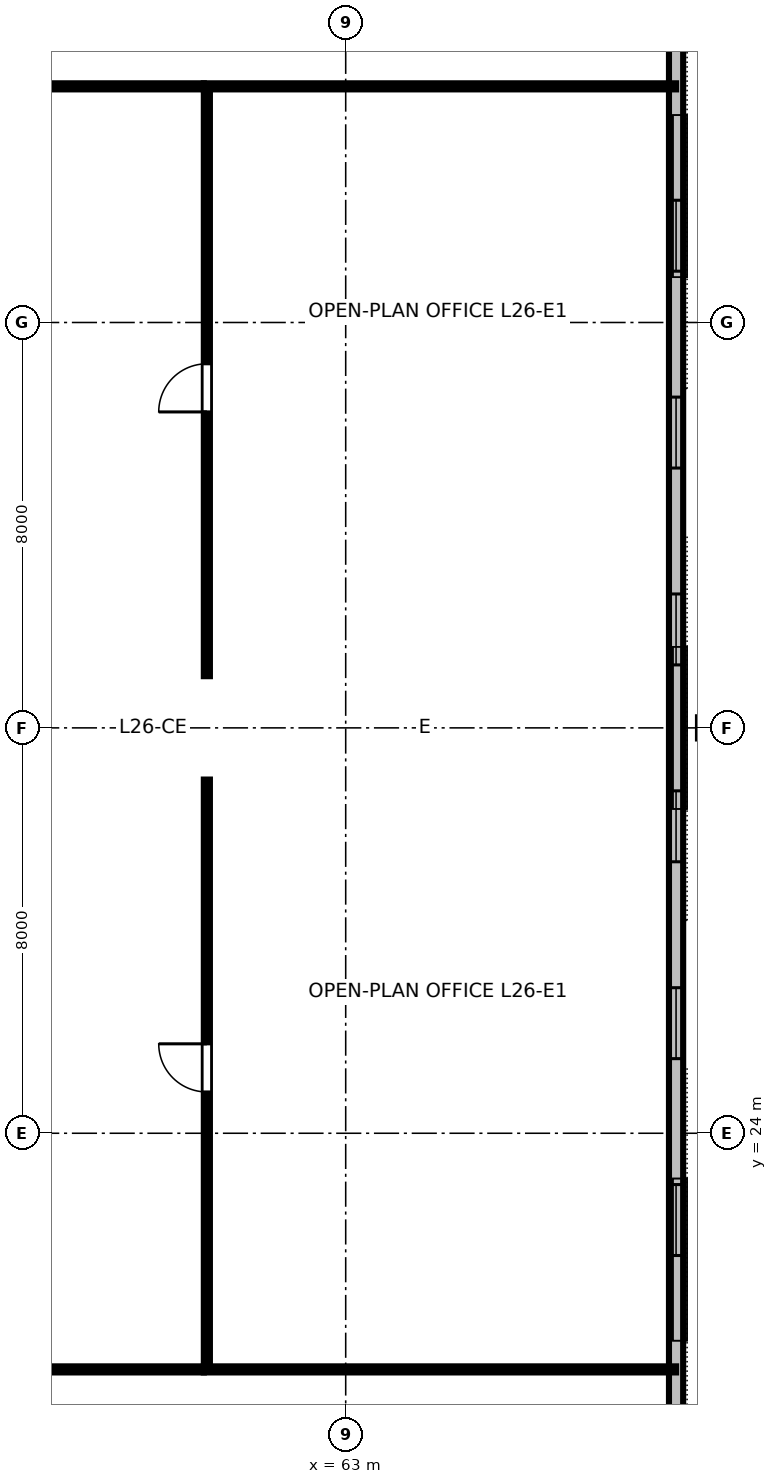
"""IFC4 building model, lengths in metres.
Left out: names, types, materials, properties, quantities, classifications, styles, units other than length and angle.
Written with IfcOpenShell. Run it as: python <this file> out.ifc"""

import sys

from ifc_helpers import new_model, si_unit, direction, frame, frame_2d, origin, origin_2d, place, context, subcontext, project, spatial, rectangle, i_section, extrude, element, fill, save


model = new_model("IFC4")
c1 = context("Model", 3, precision=1e-05, world=origin(), true_north=direction((0.0, 1.0)))
c2 = subcontext(c1, "Body", "Model", "MODEL_VIEW")
j1 = project(units=[si_unit("LENGTHUNIT", "METRE"), si_unit("PLANEANGLEUNIT", "RADIAN")], contexts=[c1])
p1 = place(None, origin())
s1 = spatial("IfcSite", under=j1, at=p1, CompositionType="ELEMENT")
p2 = place(p1, origin())
s2 = spatial("IfcBuilding", under=s1, at=p2, CompositionType="ELEMENT")
p3 = place(p2, frame((0.0, 0.0, 102.4)))
s3 = spatial("IfcBuildingStorey", under=s2, at=p3, CompositionType="ELEMENT", Elevation=102.4)
p4 = place(p3, frame((70.18, 32.0, 0.0), z_axis=(-0.190004151907, 0.0, 0.981783286809), x_axis=(0.981783286809, 0.0, 0.190004151907)))
e1 = element("IfcColumn", 1, at=p4, inside=s3, PredefinedType="COLUMN", context=c2, shape_type="SweptSolid", body=[
    extrude(i_section(OverallWidth=0.418, OverallDepth=0.455, WebThickness=0.042, FlangeThickness=0.068, FilletRadius=0.025, at=origin_2d()), origin(), (0.0, 0.0, 1.0), 3.42),
])
p5 = place(p3, frame((69.52, 15.36, 0.0), z_axis=(0.0, 0.0, 1.0), x_axis=(0.0, 1.0, 0.0)))
e2 = element("IfcWall", 2, at=p5, inside=s3, PredefinedType="STANDARD", context=c2, shape_type="SweptSolid", body=[
    extrude(rectangle(XDim=33.28, YDim=0.28, at=frame_2d((16.64, 0.0))), origin(), (0.0, 0.0, 1.0), 2.662),
])
p6 = place(p5, frame((6.228, 0.0, 0.85)))
e3 = element("IfcOpeningElement", 3, at=p6, cuts=e2, PredefinedType="OPENING", context=c2, shape_type="SweptSolid", body=[
    extrude(rectangle(XDim=1.4, YDim=1.2, at=frame_2d((0.7, 0.6))), frame((0.0, 0.15, 0.0), z_axis=(0.0, -1.0, 0.0), x_axis=(1.0, 0.0, 0.0)), (0.0, 0.0, 1.0), 0.3),
])
p7 = place(p5, frame((10.113, 0.0, 0.85)))
e4 = element("IfcOpeningElement", 4, at=p7, cuts=e2, PredefinedType="OPENING", context=c2, shape_type="SweptSolid", body=[
    extrude(rectangle(XDim=1.4, YDim=1.2, at=frame_2d((0.7, 0.6))), frame((0.0, 0.15, 0.0), z_axis=(0.0, -1.0, 0.0), x_axis=(1.0, 0.0, 0.0)), (0.0, 0.0, 1.0), 0.3),
])
p8 = place(p5, frame((13.998, 0.0, 0.85)))
e5 = element("IfcOpeningElement", 5, at=p8, cuts=e2, PredefinedType="OPENING", context=c2, shape_type="SweptSolid", body=[
    extrude(rectangle(XDim=1.4, YDim=1.2, at=frame_2d((0.7, 0.6))), frame((0.0, 0.15, 0.0), z_axis=(0.0, -1.0, 0.0), x_axis=(1.0, 0.0, 0.0)), (0.0, 0.0, 1.0), 0.3),
])
p9 = place(p5, frame((17.883, 0.0, 0.85)))
e6 = element("IfcOpeningElement", 6, at=p9, cuts=e2, PredefinedType="OPENING", context=c2, shape_type="SweptSolid", body=[
    extrude(rectangle(XDim=1.4, YDim=1.2, at=frame_2d((0.7, 0.6))), frame((0.0, 0.15, 0.0), z_axis=(0.0, -1.0, 0.0), x_axis=(1.0, 0.0, 0.0)), (0.0, 0.0, 1.0), 0.3),
])
p10 = place(p5, frame((21.768, 0.0, 0.85)))
e7 = element("IfcOpeningElement", 7, at=p10, cuts=e2, PredefinedType="OPENING", context=c2, shape_type="SweptSolid", body=[
    extrude(rectangle(XDim=1.4, YDim=1.2, at=frame_2d((0.7, 0.6))), frame((0.0, 0.15, 0.0), z_axis=(0.0, -1.0, 0.0), x_axis=(1.0, 0.0, 0.0)), (0.0, 0.0, 1.0), 0.3),
])
p11 = place(p5, frame((25.653, 0.0, 0.85)))
e8 = element("IfcOpeningElement", 8, at=p11, cuts=e2, PredefinedType="OPENING", context=c2, shape_type="SweptSolid", body=[
    extrude(rectangle(XDim=1.4, YDim=1.2, at=frame_2d((0.7, 0.6))), frame((0.0, 0.15, 0.0), z_axis=(0.0, -1.0, 0.0), x_axis=(1.0, 0.0, 0.0)), (0.0, 0.0, 1.0), 0.3),
])
p12 = place(p3, frame((31.8, 19.34, 0.0), z_axis=(0.0, 0.0, 1.0), x_axis=(1.0, 0.0, 0.0)))
e9 = element("IfcWall", 9, at=p12, inside=s3, PredefinedType="PARTITIONING", context=c2, shape_type="SweptSolid", body=[
    extrude(rectangle(XDim=28.4, YDim=0.12, at=frame_2d((14.2, 0.0))), origin(), (0.0, 0.0, 1.0), 2.64),
])
p13 = place(p12, frame((4.201, 0.0, 0.0)))
e10 = element("IfcOpeningElement", 10, at=p13, cuts=e9, PredefinedType="OPENING", context=c2, shape_type="SweptSolid", body=[
    extrude(rectangle(XDim=0.95, YDim=2.15, at=frame_2d((0.475, 1.075))), frame((0.0, 0.07, 0.0), z_axis=(0.0, -1.0, 0.0), x_axis=(1.0, 0.0, 0.0)), (0.0, 0.0, 1.0), 0.14),
])
p14 = place(p12, frame((11.29, 0.0, 0.0)))
e11 = element("IfcOpeningElement", 11, at=p14, cuts=e9, PredefinedType="OPENING", context=c2, shape_type="SweptSolid", body=[
    extrude(rectangle(XDim=0.95, YDim=2.15, at=frame_2d((0.475, 1.075))), frame((0.0, 0.07, 0.0), z_axis=(0.0, -1.0, 0.0), x_axis=(1.0, 0.0, 0.0)), (0.0, 0.0, 1.0), 0.14),
])
p15 = place(p12, frame((17.423, 0.0, 0.0)))
e12 = element("IfcOpeningElement", 12, at=p15, cuts=e9, PredefinedType="OPENING", context=c2, shape_type="SweptSolid", body=[
    extrude(rectangle(XDim=0.95, YDim=2.15, at=frame_2d((0.475, 1.075))), frame((0.0, 0.07, 0.0), z_axis=(0.0, -1.0, 0.0), x_axis=(1.0, 0.0, 0.0)), (0.0, 0.0, 1.0), 0.14),
])
p16 = place(p12, frame((24.394, 0.0, 0.0)))
e13 = element("IfcOpeningElement", 13, at=p16, cuts=e9, PredefinedType="OPENING", context=c2, shape_type="SweptSolid", body=[
    extrude(rectangle(XDim=0.95, YDim=2.15, at=frame_2d((0.475, 1.075))), frame((0.0, 0.07, 0.0), z_axis=(0.0, -1.0, 0.0), x_axis=(1.0, 0.0, 0.0)), (0.0, 0.0, 1.0), 0.14),
])
p17 = place(p3, frame((31.8, 44.66, 0.0), z_axis=(0.0, 0.0, 1.0), x_axis=(1.0, 0.0, 0.0)))
e14 = element("IfcWall", 14, at=p17, inside=s3, PredefinedType="PARTITIONING", context=c2, shape_type="SweptSolid", body=[
    extrude(rectangle(XDim=28.4, YDim=0.12, at=frame_2d((14.2, 0.0))), origin(), (0.0, 0.0, 1.0), 2.64),
])
p18 = place(p17, frame((3.452, 0.0, 0.0)))
e15 = element("IfcOpeningElement", 15, at=p18, cuts=e14, PredefinedType="OPENING", context=c2, shape_type="SweptSolid", body=[
    extrude(rectangle(XDim=0.95, YDim=2.15, at=frame_2d((0.475, 1.075))), frame((0.0, 0.07, 0.0), z_axis=(0.0, -1.0, 0.0), x_axis=(1.0, 0.0, 0.0)), (0.0, 0.0, 1.0), 0.14),
])
p19 = place(p17, frame((12.551, 0.0, 0.0)))
e16 = element("IfcOpeningElement", 16, at=p19, cuts=e14, PredefinedType="OPENING", context=c2, shape_type="SweptSolid", body=[
    extrude(rectangle(XDim=0.95, YDim=2.15, at=frame_2d((0.475, 1.075))), frame((0.0, 0.07, 0.0), z_axis=(0.0, -1.0, 0.0), x_axis=(1.0, 0.0, 0.0)), (0.0, 0.0, 1.0), 0.14),
])
p20 = place(p17, frame((22.823, 0.0, 0.0)))
e17 = element("IfcOpeningElement", 17, at=p20, cuts=e14, PredefinedType="OPENING", context=c2, shape_type="SweptSolid", body=[
    extrude(rectangle(XDim=0.95, YDim=2.15, at=frame_2d((0.475, 1.075))), frame((0.0, 0.07, 0.0), z_axis=(0.0, -1.0, 0.0), x_axis=(1.0, 0.0, 0.0)), (0.0, 0.0, 1.0), 0.14),
])
p21 = place(p3, frame((60.26, 19.4, 0.0), z_axis=(0.0, 0.0, 1.0), x_axis=(0.0, 1.0, 0.0)))
e18 = element("IfcWall", 18, at=p21, inside=s3, PredefinedType="PARTITIONING", context=c2, shape_type="SweptSolid", body=[
    extrude(rectangle(XDim=11.58, YDim=0.12, at=frame_2d((5.79, 0.0))), origin(), (0.0, 0.0, 1.0), 2.64),
])
p22 = place(p21, frame((5.415, 0.0, 0.0)))
e19 = element("IfcOpeningElement", 19, at=p22, cuts=e18, PredefinedType="OPENING", context=c2, shape_type="SweptSolid", body=[
    extrude(rectangle(XDim=0.95, YDim=2.15, at=frame_2d((0.475, 1.075))), frame((0.0, 0.07, 0.0), z_axis=(0.0, -1.0, 0.0), x_axis=(1.0, 0.0, 0.0)), (0.0, 0.0, 1.0), 0.14),
])
p23 = place(p3, frame((60.26, 33.02, 0.0), z_axis=(0.0, 0.0, 1.0), x_axis=(0.0, 1.0, 0.0)))
e20 = element("IfcWall", 20, at=p23, inside=s3, PredefinedType="PARTITIONING", context=c2, shape_type="SweptSolid", body=[
    extrude(rectangle(XDim=11.58, YDim=0.12, at=frame_2d((5.79, 0.0))), origin(), (0.0, 0.0, 1.0), 2.64),
])
p24 = place(p23, frame((5.215, 0.0, 0.0)))
e21 = element("IfcOpeningElement", 21, at=p24, cuts=e20, PredefinedType="OPENING", context=c2, shape_type="SweptSolid", body=[
    extrude(rectangle(XDim=0.95, YDim=2.15, at=frame_2d((0.475, 1.075))), frame((0.0, 0.07, 0.0), z_axis=(0.0, -1.0, 0.0), x_axis=(1.0, 0.0, 0.0)), (0.0, 0.0, 1.0), 0.14),
])
for number, where, z_axis, x_axis in (
    (22, (60.2, 19.34, 0.0), (0.0, 0.0, 1.0), (1.0, 0.0, 0.0)),
    (23, (60.2, 44.66, 0.0), (0.0, 0.0, 1.0), (1.0, 0.0, 0.0)),
):
    element("IfcWall", number, at=place(p3, frame(where, z_axis=z_axis, x_axis=x_axis)), inside=s3, PredefinedType="PARTITIONING", context=c2, shape_type="SweptSolid", body=[
        extrude(rectangle(XDim=9.32, YDim=0.12, at=frame_2d((4.66, 0.0))), origin(), (0.0, 0.0, 1.0), 2.64),
    ])
p25 = place(p6, origin())
e24 = element("IfcWindow", 24, at=p25, inside=s3, PartitioningType="SINGLE_PANEL", PredefinedType="WINDOW", context=c2, shape_type="SweptSolid", body=[
    extrude(rectangle(XDim=1.4, YDim=1.2, at=frame_2d((0.7, 0.6))), frame((0.0, 0.03, 0.0), z_axis=(0.0, -1.0, 0.0), x_axis=(1.0, 0.0, 0.0)), (0.0, 0.0, 1.0), 0.06),
])
fill(e3, e24)
p26 = place(p7, origin())
e25 = element("IfcWindow", 25, at=p26, inside=s3, PartitioningType="SINGLE_PANEL", PredefinedType="WINDOW", context=c2, shape_type="SweptSolid", body=[
    extrude(rectangle(XDim=1.4, YDim=1.2, at=frame_2d((0.7, 0.6))), frame((0.0, 0.03, 0.0), z_axis=(0.0, -1.0, 0.0), x_axis=(1.0, 0.0, 0.0)), (0.0, 0.0, 1.0), 0.06),
])
fill(e4, e25)
p27 = place(p8, origin())
e26 = element("IfcWindow", 26, at=p27, inside=s3, PartitioningType="SINGLE_PANEL", PredefinedType="WINDOW", context=c2, shape_type="SweptSolid", body=[
    extrude(rectangle(XDim=1.4, YDim=1.2, at=frame_2d((0.7, 0.6))), frame((0.0, 0.03, 0.0), z_axis=(0.0, -1.0, 0.0), x_axis=(1.0, 0.0, 0.0)), (0.0, 0.0, 1.0), 0.06),
])
fill(e5, e26)
p28 = place(p9, origin())
e27 = element("IfcWindow", 27, at=p28, inside=s3, PartitioningType="SINGLE_PANEL", PredefinedType="WINDOW", context=c2, shape_type="SweptSolid", body=[
    extrude(rectangle(XDim=1.4, YDim=1.2, at=frame_2d((0.7, 0.6))), frame((0.0, 0.03, 0.0), z_axis=(0.0, -1.0, 0.0), x_axis=(1.0, 0.0, 0.0)), (0.0, 0.0, 1.0), 0.06),
])
fill(e6, e27)
p29 = place(p10, origin())
e28 = element("IfcWindow", 28, at=p29, inside=s3, PartitioningType="SINGLE_PANEL", PredefinedType="WINDOW", context=c2, shape_type="SweptSolid", body=[
    extrude(rectangle(XDim=1.4, YDim=1.2, at=frame_2d((0.7, 0.6))), frame((0.0, 0.03, 0.0), z_axis=(0.0, -1.0, 0.0), x_axis=(1.0, 0.0, 0.0)), (0.0, 0.0, 1.0), 0.06),
])
fill(e7, e28)
p30 = place(p11, origin())
e29 = element("IfcWindow", 29, at=p30, inside=s3, PartitioningType="SINGLE_PANEL", PredefinedType="WINDOW", context=c2, shape_type="SweptSolid", body=[
    extrude(rectangle(XDim=1.4, YDim=1.2, at=frame_2d((0.7, 0.6))), frame((0.0, 0.03, 0.0), z_axis=(0.0, -1.0, 0.0), x_axis=(1.0, 0.0, 0.0)), (0.0, 0.0, 1.0), 0.06),
])
fill(e8, e29)
p31 = place(p22, origin())
e30 = element("IfcDoor", 30, at=p31, inside=s3, OperationType="SINGLE_SWING_RIGHT", PredefinedType="DOOR", context=c2, shape_type="SweptSolid", body=[
    extrude(rectangle(XDim=0.95, YDim=2.15, at=frame_2d((0.475, 1.075))), frame((0.0, 0.025, 0.0), z_axis=(0.0, -1.0, 0.0), x_axis=(1.0, 0.0, 0.0)), (0.0, 0.0, 1.0), 0.05),
])
fill(e19, e30)
p32 = place(p24, origin())
e31 = element("IfcDoor", 31, at=p32, inside=s3, OperationType="SINGLE_SWING_LEFT", PredefinedType="DOOR", context=c2, shape_type="SweptSolid", body=[
    extrude(rectangle(XDim=0.95, YDim=2.15, at=frame_2d((0.475, 1.075))), frame((0.0, 0.025, 0.0), z_axis=(0.0, -1.0, 0.0), x_axis=(1.0, 0.0, 0.0)), (0.0, 0.0, 1.0), 0.05),
])
fill(e21, e31)
save(model, sys.argv[1])
